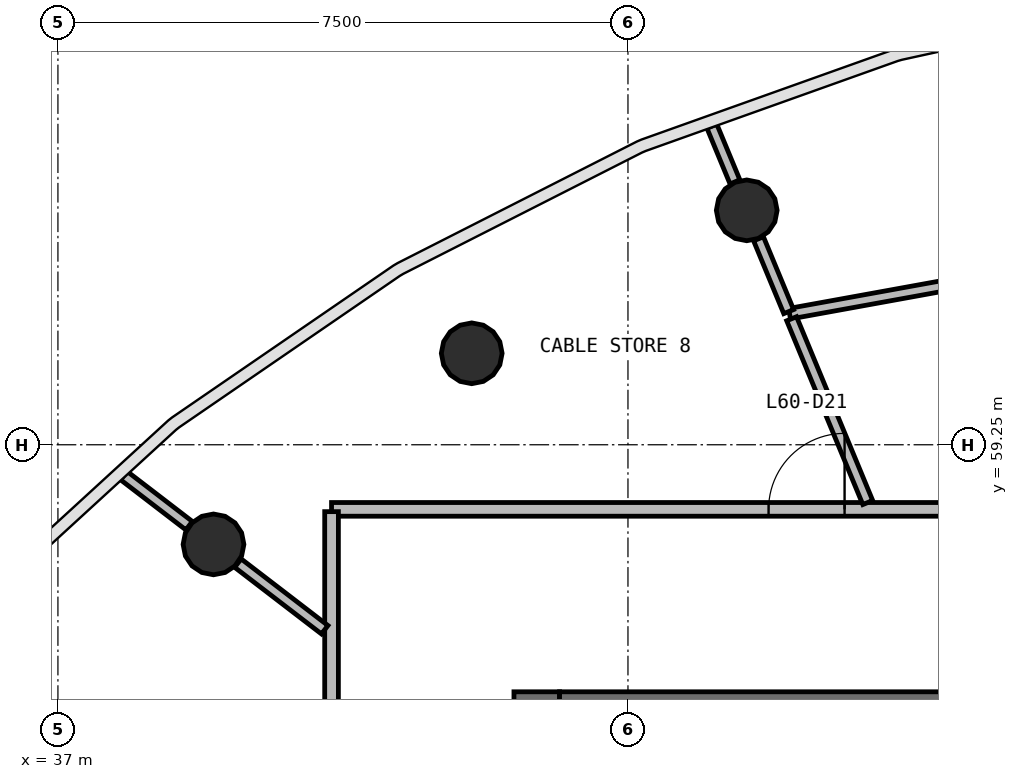
"""IFC4 building model, lengths in metres.
Left out: names, types, materials, properties, quantities, classifications, styles, units other than length and angle.
Written with IfcOpenShell. Run it as: python <this file> out.ifc"""

import sys

from ifc_helpers import new_model, si_unit, direction, frame, frame_2d, origin, origin_2d, place, context, subcontext, project, spatial, rectangle, circle, extrude, source, transform, mapped, element, fill, save


model = new_model("IFC4")
c1 = context("Model", 3, precision=1e-05, world=origin(), true_north=direction((0.0, 1.0)))
c2 = subcontext(c1, "Body", "Model", "MODEL_VIEW")
j1 = project(units=[si_unit("LENGTHUNIT", "METRE"), si_unit("PLANEANGLEUNIT", "RADIAN")], contexts=[c1])
p1 = place(None, origin())
s1 = spatial("IfcSite", under=j1, at=p1, CompositionType="ELEMENT")
p2 = place(p1, origin())
s2 = spatial("IfcBuilding", under=s1, at=p2, CompositionType="ELEMENT")
p3 = place(p2, frame((0.0, 0.0, 246.2)))
s3 = spatial("IfcBuildingStorey", under=s2, at=p3, CompositionType="ELEMENT", Elevation=246.2)
p4 = place(p3, frame((43.3, 56.0, 0.0), z_axis=(0.0, 0.0, 1.0), x_axis=(0.0, -1.0, 0.0)))
e1 = element("IfcWall", 1, at=p4, inside=s3, PredefinedType="SHEAR", context=c2, shape_type="SweptSolid", body=[
    extrude(rectangle(XDim=16.0, YDim=0.6, at=frame_2d((8.0, 0.0))), origin(), (0.0, 0.0, 1.0), 3.9),
])
p5 = place(p4, frame((7.1, 0.0, 0.0)))
e2 = element("IfcOpeningElement", 2, at=p5, cuts=e1, PredefinedType="OPENING", context=c2, shape_type="SweptSolid", body=[
    extrude(rectangle(XDim=1.8, YDim=2.1, at=frame_2d((0.9, 1.05))), frame((0.0, 0.31, 0.0), z_axis=(0.0, -1.0, 0.0), x_axis=(1.0, 0.0, 0.0)), (0.0, 0.0, 1.0), 0.62),
])
p6 = place(p3, frame((60.4, 55.7, 0.0), z_axis=(0.0, 0.0, 1.0), x_axis=(-1.0, 0.0, 0.0)))
e3 = element("IfcWall", 3, at=p6, inside=s3, PredefinedType="SHEAR", context=c2, shape_type="SweptSolid", body=[
    extrude(rectangle(XDim=16.8, YDim=0.6, at=frame_2d((8.4, 0.0))), origin(), (0.0, 0.0, 1.0), 3.9),
])
p7 = place(p6, frame((0.4, 0.0, 0.0)))
e4 = element("IfcOpeningElement", 4, at=p7, cuts=e3, PredefinedType="OPENING", context=c2, shape_type="SweptSolid", body=[
    extrude(rectangle(XDim=1.1, YDim=2.1, at=frame_2d((0.55, 1.05))), frame((0.0, 0.31, 0.0), z_axis=(0.0, -1.0, 0.0), x_axis=(1.0, 0.0, 0.0)), (0.0, 0.0, 1.0), 0.62),
])
p8 = place(p6, frame((10.3, 0.0, 0.0)))
e5 = element("IfcOpeningElement", 5, at=p8, cuts=e3, PredefinedType="OPENING", context=c2, shape_type="SweptSolid", body=[
    extrude(rectangle(XDim=1.2, YDim=2.1, at=frame_2d((0.6, 1.05))), frame((0.0, 0.31, 0.0), z_axis=(0.0, -1.0, 0.0), x_axis=(1.0, 0.0, 0.0)), (0.0, 0.0, 1.0), 0.62),
])
p9 = place(p6, frame((7.25, 0.0, 0.0)))
e6 = element("IfcOpeningElement", 6, at=p9, cuts=e3, PredefinedType="OPENING", context=c2, shape_type="SweptSolid", body=[
    extrude(rectangle(XDim=1.1, YDim=2.1, at=frame_2d((0.55, 1.05))), frame((0.0, 0.31, 0.0), z_axis=(0.0, -1.0, 0.0), x_axis=(1.0, 0.0, 0.0)), (0.0, 0.0, 1.0), 0.62),
])
m1 = source(origin(), c2, "Body", "SweptSolid", [
    extrude(circle(Radius=0.4, at=origin_2d()), origin(), (0.0, 0.0, 1.0), 3.9),
])
for number, where, z_axis, x_axis in (
    (7, (46.063, 62.334, 0.0), (0.0, 0.0, 1.0), (1.0, 0.0, 0.0)),
    (8, (42.444, 60.453, 0.0), (0.0, 0.0, 1.0), (1.0, 0.0, 0.0)),
    (9, (39.047, 57.939, 0.0), (0.0, 0.0, 1.0), (1.0, 0.0, 0.0)),
):
    element("IfcColumn", number, at=place(p3, frame(where, z_axis=z_axis, x_axis=x_axis)), inside=s3, PredefinedType="COLUMN", context=c2, shape_type="MappedRepresentation", body=[
        mapped(m1, transform((0.0, 0.0, 0.0), scale=1.0)),
    ])
p10 = place(p3, frame((40.6, 58.4, 0.0), z_axis=(0.0, 0.0, 1.0), x_axis=(1.0, 0.0, 0.0)))
e10 = element("IfcWall", 10, at=p10, inside=s3, PredefinedType="PARTITIONING", context=c2, shape_type="SweptSolid", body=[
    extrude(rectangle(XDim=22.8, YDim=0.18, at=frame_2d((11.4, 0.0))), origin(), (0.0, 0.0, 1.0), 2.88),
])
p11 = place(p10, frame((10.85, 0.0, 0.0)))
e11 = element("IfcOpeningElement", 11, at=p11, cuts=e10, PredefinedType="OPENING", context=c2, shape_type="SweptSolid", body=[
    extrude(rectangle(XDim=0.9, YDim=2.1, at=frame_2d((0.45, 1.05))), frame((0.0, 0.1, 0.0), z_axis=(0.0, -1.0, 0.0), x_axis=(1.0, 0.0, 0.0)), (0.0, 0.0, 1.0), 0.2),
])
p12 = place(p10, frame((8.85, 0.0, 0.0)))
e12 = element("IfcOpeningElement", 12, at=p12, cuts=e10, PredefinedType="OPENING", context=c2, shape_type="SweptSolid", body=[
    extrude(rectangle(XDim=0.9, YDim=2.1, at=frame_2d((0.45, 1.05))), frame((0.0, 0.1, 0.0), z_axis=(0.0, -1.0, 0.0), x_axis=(1.0, 0.0, 0.0)), (0.0, 0.0, 1.0), 0.2),
])
p13 = place(p10, frame((5.75, 0.0, 0.0)))
e13 = element("IfcOpeningElement", 13, at=p13, cuts=e10, PredefinedType="OPENING", context=c2, shape_type="SweptSolid", body=[
    extrude(rectangle(XDim=1.0, YDim=2.1, at=frame_2d((0.5, 1.05))), frame((0.0, 0.1, 0.0), z_axis=(0.0, -1.0, 0.0), x_axis=(1.0, 0.0, 0.0)), (0.0, 0.0, 1.0), 0.2),
])
p14 = place(p10, frame((16.15, 0.0, 0.0)))
e14 = element("IfcOpeningElement", 14, at=p14, cuts=e10, PredefinedType="OPENING", context=c2, shape_type="SweptSolid", body=[
    extrude(rectangle(XDim=1.0, YDim=2.1, at=frame_2d((0.5, 1.05))), frame((0.0, 0.1, 0.0), z_axis=(0.0, -1.0, 0.0), x_axis=(1.0, 0.0, 0.0)), (0.0, 0.0, 1.0), 0.2),
])
p15 = place(p10, frame((12.95, 0.0, 0.0)))
e15 = element("IfcOpeningElement", 15, at=p15, cuts=e10, PredefinedType="OPENING", context=c2, shape_type="SweptSolid", body=[
    extrude(rectangle(XDim=1.0, YDim=2.1, at=frame_2d((0.5, 1.05))), frame((0.0, 0.1, 0.0), z_axis=(0.0, -1.0, 0.0), x_axis=(1.0, 0.0, 0.0)), (0.0, 0.0, 1.0), 0.2),
])
p16 = place(p3, frame((40.6, 37.63, 0.0), z_axis=(0.0, 0.0, 1.0), x_axis=(0.0, 1.0, 0.0)))
e16 = element("IfcWall", 16, at=p16, inside=s3, PredefinedType="PARTITIONING", context=c2, shape_type="SweptSolid", body=[
    extrude(rectangle(XDim=20.74, YDim=0.18, at=frame_2d((10.37, 0.0))), origin(), (0.0, 0.0, 1.0), 2.88),
])
p17 = place(p16, frame((12.09, 0.0, 0.0)))
e17 = element("IfcOpeningElement", 17, at=p17, cuts=e16, PredefinedType="OPENING", context=c2, shape_type="SweptSolid", body=[
    extrude(rectangle(XDim=1.0, YDim=2.1, at=frame_2d((0.5, 1.05))), frame((0.0, 0.1, 0.0), z_axis=(0.0, -1.0, 0.0), x_axis=(1.0, 0.0, 0.0)), (0.0, 0.0, 1.0), 0.2),
])
p18 = place(p16, frame((9.89, 0.0, 0.0)))
e18 = element("IfcOpeningElement", 18, at=p18, cuts=e16, PredefinedType="OPENING", context=c2, shape_type="SweptSolid", body=[
    extrude(rectangle(XDim=1.0, YDim=2.1, at=frame_2d((0.5, 1.05))), frame((0.0, 0.1, 0.0), z_axis=(0.0, -1.0, 0.0), x_axis=(1.0, 0.0, 0.0)), (0.0, 0.0, 1.0), 0.2),
])
p19 = place(p3, frame((50.177, 61.618, 0.0), z_axis=(0.0, 0.0, 1.0), x_axis=(-0.983923982587, -0.178587783708, 0.0)))
e19 = element("IfcWall", 19, at=p19, inside=s3, PredefinedType="PARTITIONING", context=c2, shape_type="SweptSolid", body=[
    extrude(rectangle(XDim=3.609, YDim=0.14, at=frame_2d((1.805, 0.0))), origin(), (0.0, 0.0, 1.0), 2.88),
])
p20 = place(p3, frame((47.655, 58.49, 0.0), z_axis=(0.0, 0.0, 1.0), x_axis=(-0.382686863779, 0.923878111166, 0.0)))
e20 = element("IfcWall", 20, at=p20, inside=s3, PredefinedType="PARTITIONING", context=c2, shape_type="SweptSolid", body=[
    extrude(rectangle(XDim=2.617, YDim=0.14, at=frame_2d((1.309, 0.0))), origin(), (0.0, 0.0, 1.0), 2.88),
])
p21 = place(p3, frame((40.51, 56.817, 0.0), z_axis=(0.0, 0.0, 1.0), x_axis=(-0.793316945216, 0.608808857059, 0.0)))
e21 = element("IfcWall", 21, at=p21, inside=s3, PredefinedType="PARTITIONING", context=c2, shape_type="SweptSolid", body=[
    extrude(rectangle(XDim=1.44, YDim=0.14, at=frame_2d((0.72, 0.0))), origin(), (0.0, 0.0, 1.0), 2.88),
])
p22 = place(p3, frame((38.726, 58.186, 0.0), z_axis=(0.0, 0.0, 1.0), x_axis=(-0.793403043082, 0.608696649596, 0.0)))
e22 = element("IfcWall", 22, at=p22, inside=s3, PredefinedType="PARTITIONING", context=c2, shape_type="SweptSolid", body=[
    extrude(rectangle(XDim=1.083, YDim=0.14, at=frame_2d((0.541, 0.0))), origin(), (0.0, 0.0, 1.0), 2.88),
])
p23 = place(p3, frame((46.615, 61.002, 0.0), z_axis=(0.0, 0.0, 1.0), x_axis=(-0.382608264474, 0.923910664489, 0.0)))
e23 = element("IfcWall", 23, at=p23, inside=s3, PredefinedType="PARTITIONING", context=c2, shape_type="SweptSolid", body=[
    extrude(rectangle(XDim=1.037, YDim=0.14, at=frame_2d((0.519, 0.0))), origin(), (0.0, 0.0, 1.0), 2.88),
])
p24 = place(p3, frame((45.908, 62.708, 0.0), z_axis=(0.0, 0.0, 1.0), x_axis=(-0.382669005831, 0.923885508045, 0.0)))
e24 = element("IfcWall", 24, at=p24, inside=s3, PredefinedType="PARTITIONING", context=c2, shape_type="SweptSolid", body=[
    extrude(rectangle(XDim=0.793, YDim=0.14, at=frame_2d((0.396, 0.0))), origin(), (0.0, 0.0, 1.0), 2.88),
])
m2 = source(origin(), c2, "Body", "SweptSolid", [
    extrude(rectangle(XDim=1.0, YDim=2.1, at=frame_2d((0.5, 1.05))), frame((0.0, 0.025, 0.0), z_axis=(0.0, -1.0, 0.0), x_axis=(1.0, 0.0, 0.0)), (0.0, 0.0, 1.0), 0.05),
])
p25 = place(p13, origin())
e25 = element("IfcDoor", 25, at=p25, inside=s3, OperationType="SINGLE_SWING_RIGHT", PredefinedType="DOOR", context=c2, shape_type="MappedRepresentation", body=[
    mapped(m2, transform((0.0, 0.0, 0.0), scale=1.0)),
])
fill(e13, e25)
save(model, sys.argv[1])
